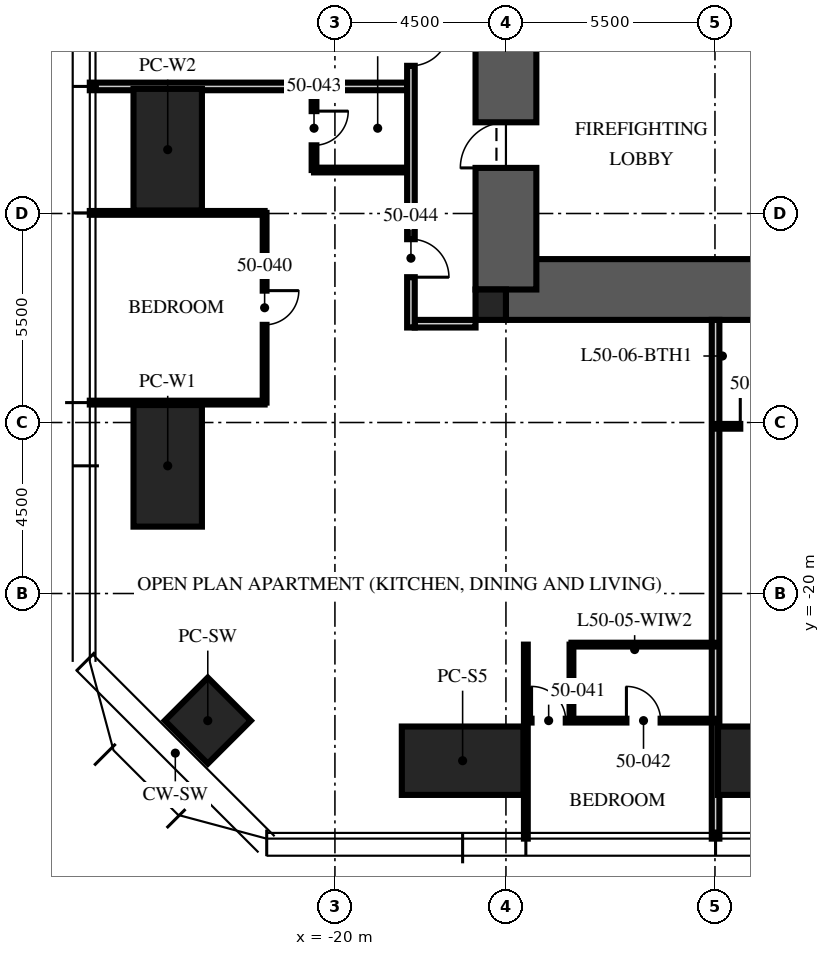
"""IFC4 building model, lengths in metres.
Left out: names, types, materials, properties, quantities, classifications, styles, units other than length and angle.
Written with IfcOpenShell. Run it as: python <this file> out.ifc"""

import sys

from ifc_helpers import new_model, si_unit, direction, frame, frame_2d, origin, origin_2d, place, context, subcontext, project, spatial, rectangle, hollow_rectangle, extrude, element, fill, save


model = new_model("IFC4")
c1 = context("Model", 3, precision=1e-05, world=origin(), true_north=direction((0.0, 1.0)))
c2 = subcontext(c1, "Body", "Model", "MODEL_VIEW")
j1 = project(units=[si_unit("LENGTHUNIT", "METRE"), si_unit("PLANEANGLEUNIT", "RADIAN")], contexts=[c1])
p1 = place(None, origin())
s1 = spatial("IfcSite", under=j1, at=p1, CompositionType="ELEMENT")
p2 = place(p1, origin())
s2 = spatial("IfcBuilding", under=s1, at=p2, CompositionType="ELEMENT")
p3 = place(p2, frame((0.0, 0.0, 203.25)))
s3 = spatial("IfcBuildingStorey", under=s2, at=p3, CompositionType="ELEMENT", Elevation=203.25)
p4 = place(p3, frame((-15.5, -12.0, -0.25), z_axis=(0.0, 0.0, 1.0), x_axis=(1.0, 0.0, 0.0)))
e1 = element("IfcWall", 1, at=p4, inside=s3, PredefinedType="SHEAR", context=c2, shape_type="SweptSolid", body=[
    extrude(rectangle(XDim=31.0, YDim=1.6, at=frame_2d((15.5, 0.0))), origin(), (0.0, 0.0, 1.0), 3.75),
])
p5 = place(p3, frame((-15.5, -12.0, -0.25), z_axis=(0.0, 0.0, 1.0), x_axis=(0.0, 1.0, 0.0)))
e2 = element("IfcWall", 2, at=p5, inside=s3, PredefinedType="SHEAR", context=c2, shape_type="SweptSolid", body=[
    extrude(rectangle(XDim=24.0, YDim=1.6, at=frame_2d((12.0, 0.0))), origin(), (0.0, 0.0, 1.0), 3.75),
])
p6 = place(p5, frame((3.2, 0.0, 0.25)))
e3 = element("IfcOpeningElement", 3, at=p6, cuts=e2, PredefinedType="OPENING", context=c2, shape_type="SweptSolid", body=[
    extrude(rectangle(XDim=1.2, YDim=2.1, at=frame_2d((0.6, 1.05))), frame((0.0, 0.81, 0.0), z_axis=(0.0, -1.0, 0.0), x_axis=(1.0, 0.0, 0.0)), (0.0, 0.0, 1.0), 1.62),
])
p7 = place(p5, frame((19.3, 0.0, 0.25)))
e4 = element("IfcOpeningElement", 4, at=p7, cuts=e2, PredefinedType="OPENING", context=c2, shape_type="SweptSolid", body=[
    extrude(rectangle(XDim=1.8, YDim=2.1, at=frame_2d((0.9, 1.05))), frame((0.0, 0.81, 0.0), z_axis=(0.0, -1.0, 0.0), x_axis=(1.0, 0.0, 0.0)), (0.0, 0.0, 1.0), 1.62),
])
p8 = place(p3, frame((-15.9, -12.4, -0.25), z_axis=(0.0, 0.0, 1.0), x_axis=(1.0, 0.0, 0.0)))
e5 = element("IfcColumn", 5, at=p8, inside=s3, PredefinedType="COLUMN", context=c2, shape_type="SweptSolid", body=[
    extrude(rectangle(XDim=0.8, YDim=0.8, at=origin_2d()), origin(), (0.0, 0.0, 1.0), 3.75),
])
for number, where, z_axis, x_axis in (
    (6, (-8.32, -24.4, 0.0), (0.0, 0.0, 1.0), (1.0, 0.0, 0.0)),
    (7, (-16.64, -24.4, 0.0), (0.0, 0.0, 1.0), (1.0, 0.0, 0.0)),
    (8, (-24.4, -16.64, 0.0), (0.0, 0.0, 1.0), (0.0, 1.0, 0.0)),
    (9, (-24.4, -8.32, 0.0), (0.0, 0.0, 1.0), (0.0, 1.0, 0.0)),
):
    element("IfcColumn", number, at=place(p3, frame(where, z_axis=z_axis, x_axis=x_axis)), inside=s3, PredefinedType="COLUMN", context=c2, shape_type="SweptSolid", body=[
        extrude(hollow_rectangle(XDim=3.2, YDim=1.8, WallThickness=0.2, at=origin_2d()), origin(), (0.0, 0.0, 1.0), 3.75),
    ])
p9 = place(p3, frame((-23.346, -23.346, 0.0), z_axis=(0.0, 0.0, 1.0), x_axis=(0.707106781187, -0.707106781187, 0.0)))
e10 = element("IfcColumn", 10, at=p9, inside=s3, PredefinedType="COLUMN", context=c2, shape_type="SweptSolid", body=[
    extrude(hollow_rectangle(XDim=1.6, YDim=1.6, WallThickness=0.1, at=origin_2d()), origin(), (0.0, 0.0, 1.0), 3.75),
])
p10 = place(p3, frame((-16.3, -12.9, 0.0), z_axis=(0.0, 0.0, 1.0), x_axis=(-1.0, 0.0, 0.0)))
e11 = element("IfcWall", 11, at=p10, inside=s3, PredefinedType="PARTITIONING", context=c2, shape_type="SweptSolid", body=[
    extrude(rectangle(XDim=1.6, YDim=0.2, at=frame_2d((0.8, 0.0))), origin(), (0.0, 0.0, 1.0), 2.3),
])
p11 = place(p3, frame((-18.1, -6.656, 0.0), z_axis=(0.0, 0.0, 1.0), x_axis=(-1.0, 0.0, 0.0)))
e12 = element("IfcWall", 12, at=p11, inside=s3, PredefinedType="PARTITIONING", context=c2, shape_type="SweptSolid", body=[
    extrude(rectangle(XDim=8.35, YDim=0.2, at=frame_2d((4.175, 0.0))), origin(), (0.0, 0.0, 1.0), 2.91),
])
for number, where, z_axis, x_axis in (
    (13, (-21.85, -9.984, 0.0), (0.0, 0.0, 1.0), (-1.0, 0.0, 0.0)),
    (14, (-21.85, -14.976, 0.0), (0.0, 0.0, 1.0), (-1.0, 0.0, 0.0)),
):
    element("IfcWall", number, at=place(p3, frame(where, z_axis=z_axis, x_axis=x_axis)), inside=s3, PredefinedType="PARTITIONING", context=c2, shape_type="SweptSolid", body=[
        extrude(rectangle(XDim=4.6, YDim=0.1, at=frame_2d((2.3, 0.0))), origin(), (0.0, 0.0, 1.0), 2.91),
    ])
p12 = place(p3, frame((-14.976, -21.345, 0.0), z_axis=(0.0, 0.0, 1.0), x_axis=(0.0, -1.0, 0.0)))
e15 = element("IfcWall", 15, at=p12, inside=s3, PredefinedType="PARTITIONING", context=c2, shape_type="SweptSolid", body=[
    extrude(rectangle(XDim=5.105, YDim=0.1, at=frame_2d((2.552, 0.0))), origin(), (0.0, 0.0, 1.0), 2.91),
])
p13 = place(p3, frame((-9.984, -12.8, 0.0), z_axis=(0.0, 0.0, 1.0), x_axis=(0.0, -1.0, 0.0)))
e16 = element("IfcWall", 16, at=p13, inside=s3, PredefinedType="PARTITIONING", context=c2, shape_type="SweptSolid", body=[
    extrude(rectangle(XDim=13.65, YDim=0.2, at=frame_2d((6.825, 0.0))), origin(), (0.0, 0.0, 1.0), 2.91),
])
p14 = place(p3, frame((-21.85, -9.984, 0.0), z_axis=(0.0, 0.0, 1.0), x_axis=(0.0, -1.0, 0.0)))
e17 = element("IfcWall", 17, at=p14, inside=s3, PredefinedType="PARTITIONING", context=c2, shape_type="SweptSolid", body=[
    extrude(rectangle(XDim=4.992, YDim=0.1, at=frame_2d((2.496, 0.0))), origin(), (0.0, 0.0, 1.0), 2.81),
])
p15 = place(p14, frame((2.046, 0.0, 0.0)))
e18 = element("IfcOpeningElement", 18, at=p15, cuts=e17, PredefinedType="OPENING", context=c2, shape_type="SweptSolid", body=[
    extrude(rectangle(XDim=0.9, YDim=2.1, at=frame_2d((0.45, 1.05))), frame((0.0, 0.06, 0.0), z_axis=(0.0, -1.0, 0.0), x_axis=(1.0, 0.0, 0.0)), (0.0, 0.0, 1.0), 0.12),
])
p16 = place(p3, frame((-14.976, -23.345, 0.0), z_axis=(0.0, 0.0, 1.0), x_axis=(1.0, 0.0, 0.0)))
e19 = element("IfcWall", 19, at=p16, inside=s3, PredefinedType="PARTITIONING", context=c2, shape_type="SweptSolid", body=[
    extrude(rectangle(XDim=4.992, YDim=0.1, at=frame_2d((2.496, 0.0))), origin(), (0.0, 0.0, 1.0), 2.81),
])
p17 = place(p16, frame((0.15, 0.0, 0.0)))
e20 = element("IfcOpeningElement", 20, at=p17, cuts=e19, PredefinedType="OPENING", context=c2, shape_type="SweptSolid", body=[
    extrude(rectangle(XDim=0.9, YDim=2.1, at=frame_2d((0.45, 1.05))), frame((0.0, 0.06, 0.0), z_axis=(0.0, -1.0, 0.0), x_axis=(1.0, 0.0, 0.0)), (0.0, 0.0, 1.0), 0.12),
])
p18 = place(p16, frame((2.646, 0.0, 0.0)))
e21 = element("IfcOpeningElement", 21, at=p18, cuts=e19, PredefinedType="OPENING", context=c2, shape_type="SweptSolid", body=[
    extrude(rectangle(XDim=0.9, YDim=2.1, at=frame_2d((0.45, 1.05))), frame((0.0, 0.06, 0.0), z_axis=(0.0, -1.0, 0.0), x_axis=(1.0, 0.0, 0.0)), (0.0, 0.0, 1.0), 0.12),
])
p19 = place(p3, frame((-13.776, -21.345, 0.0), z_axis=(0.0, 0.0, 1.0), x_axis=(0.0, -1.0, 0.0)))
e22 = element("IfcWall", 22, at=p19, inside=s3, PredefinedType="PARTITIONING", context=c2, shape_type="SweptSolid", body=[
    extrude(rectangle(XDim=2.0, YDim=0.1, at=frame_2d((1.0, 0.0))), origin(), (0.0, 0.0, 1.0), 3.5),
])
p20 = place(p3, frame((-13.776, -21.345, 0.0), z_axis=(0.0, 0.0, 1.0), x_axis=(1.0, 0.0, 0.0)))
e23 = element("IfcWall", 23, at=p20, inside=s3, PredefinedType="PARTITIONING", context=c2, shape_type="SweptSolid", body=[
    extrude(rectangle(XDim=3.792, YDim=0.1, at=frame_2d((1.896, 0.0))), origin(), (0.0, 0.0, 1.0), 2.81),
])
p21 = place(p3, frame((-20.55, -6.656, 0.0), z_axis=(0.0, 0.0, 1.0), x_axis=(0.0, -1.0, 0.0)))
e24 = element("IfcWall", 24, at=p21, inside=s3, PredefinedType="PARTITIONING", context=c2, shape_type="SweptSolid", body=[
    extrude(rectangle(XDim=2.2, YDim=0.125, at=frame_2d((1.1, 0.0))), origin(), (0.0, 0.0, 1.0), 2.6),
])
p22 = place(p21, frame((0.65, 0.0, 0.0)))
e25 = element("IfcOpeningElement", 25, at=p22, cuts=e24, PredefinedType="OPENING", context=c2, shape_type="SweptSolid", body=[
    extrude(rectangle(XDim=0.9, YDim=2.1, at=frame_2d((0.45, 1.05))), frame((0.0, 0.073, 0.0), z_axis=(0.0, -1.0, 0.0), x_axis=(1.0, 0.0, 0.0)), (0.0, 0.0, 1.0), 0.145),
])
p23 = place(p3, frame((-18.1, -8.856, 0.0), z_axis=(0.0, 0.0, 1.0), x_axis=(-1.0, 0.0, 0.0)))
e26 = element("IfcWall", 26, at=p23, inside=s3, PredefinedType="PARTITIONING", context=c2, shape_type="SweptSolid", body=[
    extrude(rectangle(XDim=2.45, YDim=0.125, at=frame_2d((1.225, 0.0))), origin(), (0.0, 0.0, 1.0), 3.5),
])
p24 = place(p3, frame((-9.984, -15.6, 0.0), z_axis=(0.0, 0.0, 1.0), x_axis=(1.0, 0.0, 0.0)))
e27 = element("IfcWall", 27, at=p24, inside=s3, PredefinedType="PARTITIONING", context=c2, shape_type="SweptSolid", body=[
    extrude(rectangle(XDim=4.0, YDim=0.125, at=frame_2d((2.0, 0.0))), origin(), (0.0, 0.0, 1.0), 2.6),
])
p25 = place(p24, frame((0.65, 0.0, 0.0)))
e28 = element("IfcOpeningElement", 28, at=p25, cuts=e27, PredefinedType="OPENING", context=c2, shape_type="SweptSolid", body=[
    extrude(rectangle(XDim=0.9, YDim=2.1, at=frame_2d((0.45, 1.05))), frame((0.0, 0.073, 0.0), z_axis=(0.0, -1.0, 0.0), x_axis=(1.0, 0.0, 0.0)), (0.0, 0.0, 1.0), 0.145),
])
p26 = place(p24, frame((2.65, 0.0, 0.0)))
e29 = element("IfcOpeningElement", 29, at=p26, cuts=e27, PredefinedType="OPENING", context=c2, shape_type="SweptSolid", body=[
    extrude(rectangle(XDim=0.9, YDim=2.1, at=frame_2d((0.45, 1.05))), frame((0.0, 0.073, 0.0), z_axis=(0.0, -1.0, 0.0), x_axis=(1.0, 0.0, 0.0)), (0.0, 0.0, 1.0), 0.145),
])
p27 = place(p3, frame((-18.0, 12.8, 0.0), z_axis=(0.0, 0.0, 1.0), x_axis=(0.0, -1.0, 0.0)))
e30 = element("IfcWall", 30, at=p27, inside=s3, PredefinedType="PARTITIONING", context=c2, shape_type="SweptSolid", body=[
    extrude(rectangle(XDim=25.8, YDim=0.2, at=frame_2d((12.9, 0.0))), origin(), (0.0, 0.0, 1.0), 2.6),
])
p28 = place(p27, frame((4.4, 0.0, 0.0)))
e31 = element("IfcOpeningElement", 31, at=p28, cuts=e30, PredefinedType="OPENING", context=c2, shape_type="SweptSolid", body=[
    extrude(rectangle(XDim=1.0, YDim=2.2, at=frame_2d((0.5, 1.1))), frame((0.0, 0.11, 0.0), z_axis=(0.0, -1.0, 0.0), x_axis=(1.0, 0.0, 0.0)), (0.0, 0.0, 1.0), 0.22),
])
p29 = place(p27, frame((17.914, 0.0, 0.0)))
e32 = element("IfcOpeningElement", 32, at=p29, cuts=e30, PredefinedType="OPENING", context=c2, shape_type="SweptSolid", body=[
    extrude(rectangle(XDim=1.0, YDim=2.2, at=frame_2d((0.5, 1.1))), frame((0.0, 0.11, 0.0), z_axis=(0.0, -1.0, 0.0), x_axis=(1.0, 0.0, 0.0)), (0.0, 0.0, 1.0), 0.22),
])
p30 = place(p27, frame((23.476, 0.0, 0.0)))
e33 = element("IfcOpeningElement", 33, at=p30, cuts=e30, PredefinedType="OPENING", context=c2, shape_type="SweptSolid", body=[
    extrude(rectangle(XDim=1.0, YDim=2.2, at=frame_2d((0.5, 1.1))), frame((0.0, 0.11, 0.0), z_axis=(0.0, -1.0, 0.0), x_axis=(1.0, 0.0, 0.0)), (0.0, 0.0, 1.0), 0.22),
])
p31 = place(p6, origin())
e34 = element("IfcDoor", 34, at=p31, inside=s3, OperationType="SINGLE_SWING_LEFT", PredefinedType="DOOR", context=c2, shape_type="SweptSolid", body=[
    extrude(rectangle(XDim=1.2, YDim=2.1, at=frame_2d((0.6, 1.05))), frame((0.0, 0.025, 0.0), z_axis=(0.0, -1.0, 0.0), x_axis=(1.0, 0.0, 0.0)), (0.0, 0.0, 1.0), 0.05),
])
fill(e3, e34)
p32 = place(p29, origin())
e35 = element("IfcDoor", 35, at=p32, inside=s3, OperationType="SINGLE_SWING_LEFT", PredefinedType="DOOR", context=c2, shape_type="SweptSolid", body=[
    extrude(rectangle(XDim=1.0, YDim=2.2, at=frame_2d((0.5, 1.1))), frame((0.0, 0.025, 0.0), z_axis=(0.0, -1.0, 0.0), x_axis=(1.0, 0.0, 0.0)), (0.0, 0.0, 1.0), 0.05),
])
fill(e32, e35)
p33 = place(p15, origin())
e36 = element("IfcDoor", 36, at=p33, inside=s3, OperationType="SINGLE_SWING_LEFT", PredefinedType="DOOR", context=c2, shape_type="SweptSolid", body=[
    extrude(rectangle(XDim=0.9, YDim=2.1, at=frame_2d((0.45, 1.05))), frame((0.0, 0.025, 0.0), z_axis=(0.0, -1.0, 0.0), x_axis=(1.0, 0.0, 0.0)), (0.0, 0.0, 1.0), 0.05),
])
fill(e18, e36)
p34 = place(p17, origin())
e37 = element("IfcDoor", 37, at=p34, inside=s3, OperationType="SINGLE_SWING_LEFT", PredefinedType="DOOR", context=c2, shape_type="SweptSolid", body=[
    extrude(rectangle(XDim=0.9, YDim=2.1, at=frame_2d((0.45, 1.05))), frame((0.0, 0.025, 0.0), z_axis=(0.0, -1.0, 0.0), x_axis=(1.0, 0.0, 0.0)), (0.0, 0.0, 1.0), 0.05),
])
fill(e20, e37)
p35 = place(p18, origin())
e38 = element("IfcDoor", 38, at=p35, inside=s3, OperationType="SINGLE_SWING_LEFT", PredefinedType="DOOR", context=c2, shape_type="SweptSolid", body=[
    extrude(rectangle(XDim=0.9, YDim=2.1, at=frame_2d((0.45, 1.05))), frame((0.0, 0.025, 0.0), z_axis=(0.0, -1.0, 0.0), x_axis=(1.0, 0.0, 0.0)), (0.0, 0.0, 1.0), 0.05),
])
fill(e21, e38)
p36 = place(p22, origin())
e39 = element("IfcDoor", 39, at=p36, inside=s3, OperationType="SINGLE_SWING_LEFT", PredefinedType="DOOR", context=c2, shape_type="SweptSolid", body=[
    extrude(rectangle(XDim=0.9, YDim=2.1, at=frame_2d((0.45, 1.05))), frame((0.0, 0.025, 0.0), z_axis=(0.0, -1.0, 0.0), x_axis=(1.0, 0.0, 0.0)), (0.0, 0.0, 1.0), 0.05),
])
fill(e25, e39)
p37 = place(p30, origin())
e40 = element("IfcDoor", 40, at=p37, inside=s3, OperationType="SINGLE_SWING_RIGHT", PredefinedType="DOOR", context=c2, shape_type="SweptSolid", body=[
    extrude(rectangle(XDim=1.0, YDim=2.2, at=frame_2d((0.5, 1.1))), frame((0.0, 0.025, 0.0), z_axis=(0.0, -1.0, 0.0), x_axis=(1.0, 0.0, 0.0)), (0.0, 0.0, 1.0), 0.05),
])
fill(e33, e40)
p38 = place(p25, origin())
e41 = element("IfcDoor", 41, at=p38, inside=s3, OperationType="SINGLE_SWING_LEFT", PredefinedType="DOOR", context=c2, shape_type="SweptSolid", body=[
    extrude(rectangle(XDim=0.9, YDim=2.1, at=frame_2d((0.45, 1.05))), frame((0.0, 0.025, 0.0), z_axis=(0.0, -1.0, 0.0), x_axis=(1.0, 0.0, 0.0)), (0.0, 0.0, 1.0), 0.05),
])
fill(e28, e41)
save(model, sys.argv[1])
